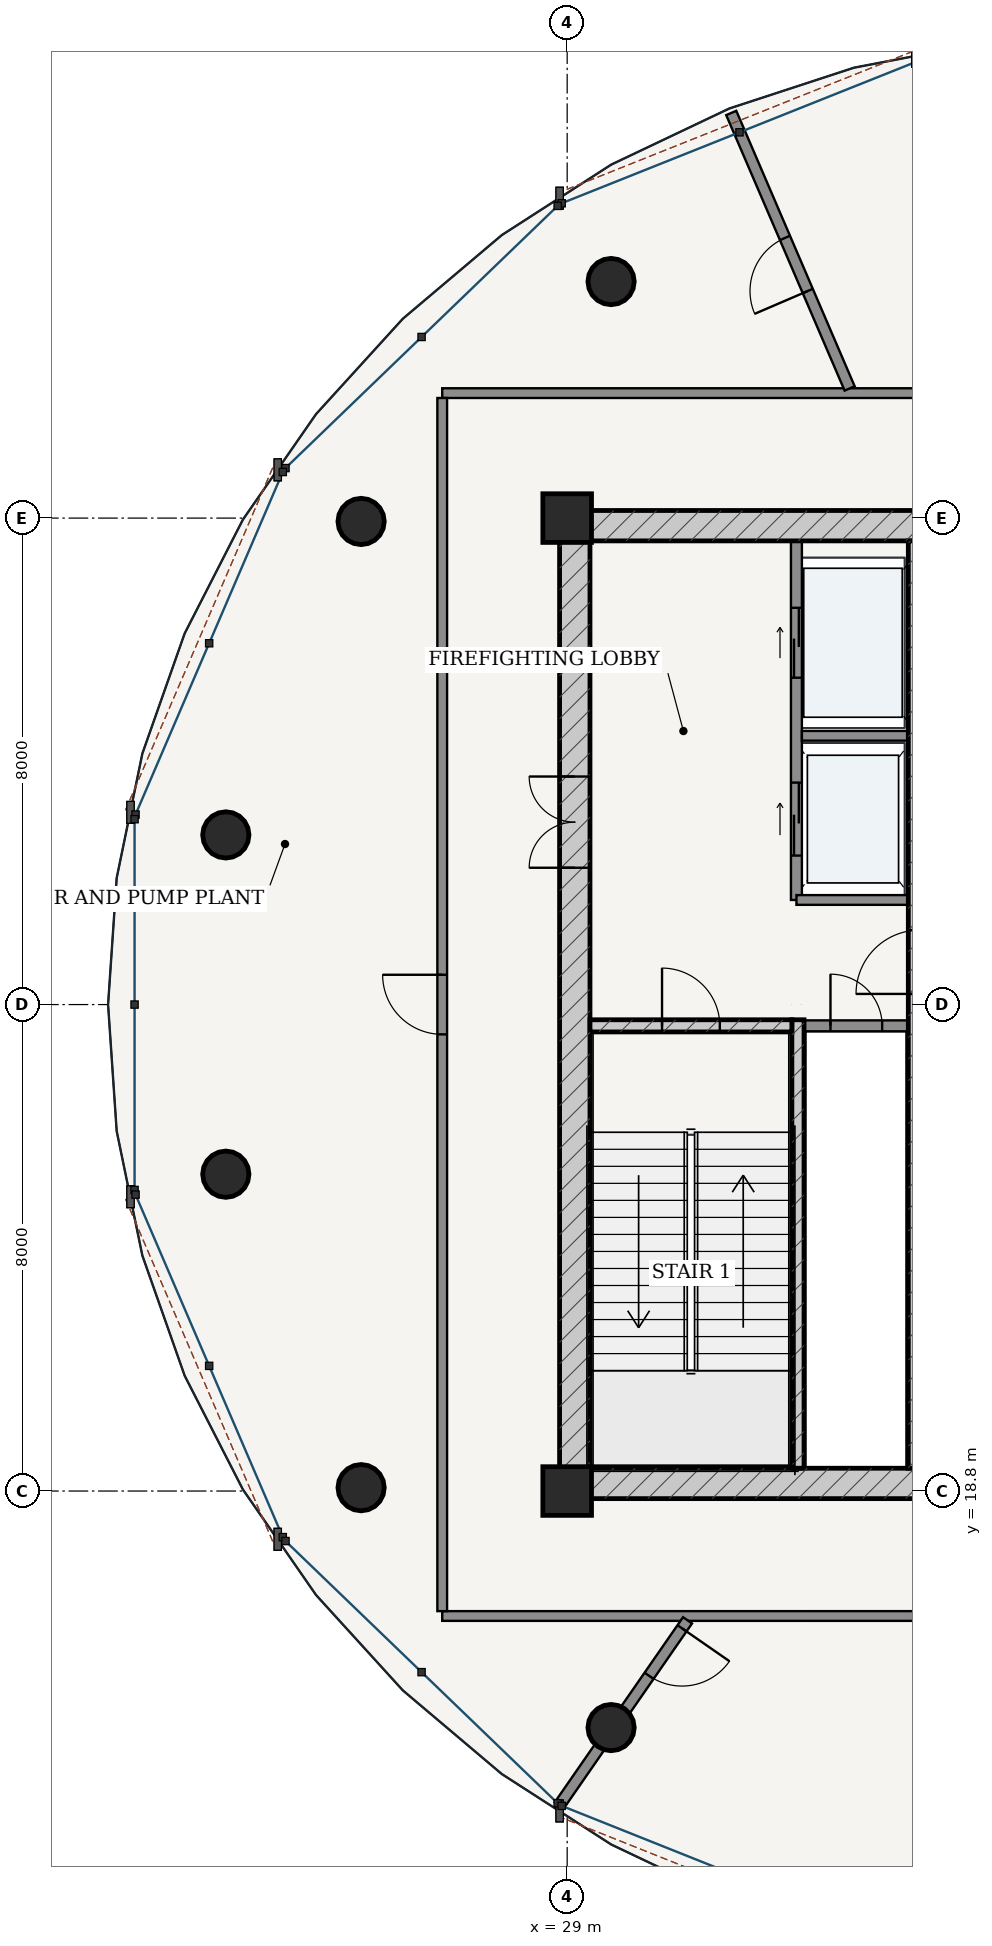
"""IFC4 building model, lengths in metres.
Left out: names, types, materials, properties, quantities, classifications, styles, units other than length and angle.
Written with IfcOpenShell. Run it as: python <this file> out.ifc"""

import sys

from ifc_helpers import new_model, si_unit, direction, frame, frame_2d, origin, origin_2d, place, context, subcontext, project, spatial, rectangle, hollow_circle, extrude, source, transform, mapped, element, fill, save


model = new_model("IFC4")
c1 = context("Model", 3, precision=1e-05, world=origin(), true_north=direction((-0.2419218956, 0.970295726276)))
c2 = subcontext(c1, "Body", "Model", "MODEL_VIEW")
j1 = project(units=[si_unit("LENGTHUNIT", "METRE"), si_unit("PLANEANGLEUNIT", "RADIAN")], contexts=[c1])
p1 = place(None, origin())
s1 = spatial("IfcSite", under=j1, at=p1, CompositionType="ELEMENT")
p2 = place(p1, origin())
s2 = spatial("IfcBuilding", under=s1, at=p2, CompositionType="ELEMENT")
p3 = place(p2, frame((0.0, 0.0, 326.9)))
s3 = spatial("IfcBuildingStorey", under=s2, at=p3, CompositionType="ELEMENT", Elevation=326.9)
for number, where, z_axis, x_axis in (
    (1, (29.0, 18.8, 0.0), (0.0, 0.0, 1.0), (1.0, 0.0, 0.0)),
    (2, (29.0, 34.8, 0.0), (0.0, 0.0, 1.0), (1.0, 0.0, 0.0)),
):
    element("IfcColumn", number, at=place(p3, frame(where, z_axis=z_axis, x_axis=x_axis)), inside=s3, PredefinedType="COLUMN", context=c2, shape_type="SweptSolid", body=[
        extrude(rectangle(XDim=0.8, YDim=0.8, at=origin_2d()), origin(), (0.0, 0.0, 1.0), 5.2),
    ])
p4 = place(p3, frame((28.875, 18.925, 0.0), z_axis=(0.0, 0.0, 1.0), x_axis=(1.0, 0.0, 0.0)))
e3 = element("IfcWall", 3, at=p4, inside=s3, PredefinedType="SHEAR", context=c2, shape_type="SweptSolid", body=[
    extrude(rectangle(XDim=18.25, YDim=0.5, at=frame_2d((9.125, 0.0))), origin(), (0.0, 0.0, 1.0), 4.78),
])
p5 = place(p4, frame((8.7, 0.0, 0.0)))
e4 = element("IfcOpeningElement", 4, at=p5, cuts=e3, PredefinedType="OPENING", context=c2, shape_type="SweptSolid", body=[
    extrude(rectangle(XDim=0.85, YDim=2.1, at=frame_2d((0.425, 1.05))), frame((0.0, 0.26, 0.0), z_axis=(0.0, -1.0, 0.0), x_axis=(1.0, 0.0, 0.0)), (0.0, 0.0, 1.0), 0.52),
])
p6 = place(p3, frame((28.875, 34.675, 0.0), z_axis=(0.0, 0.0, 1.0), x_axis=(1.0, 0.0, 0.0)))
e5 = element("IfcWall", 5, at=p6, inside=s3, PredefinedType="SHEAR", context=c2, shape_type="SweptSolid", body=[
    extrude(rectangle(XDim=18.25, YDim=0.5, at=frame_2d((9.125, 0.0))), origin(), (0.0, 0.0, 1.0), 4.78),
])
p7 = place(p3, frame((29.125, 19.175, 0.0), z_axis=(0.0, 0.0, 1.0), x_axis=(0.0, 1.0, 0.0)))
e6 = element("IfcWall", 6, at=p7, inside=s3, PredefinedType="SHEAR", context=c2, shape_type="SweptSolid", body=[
    extrude(rectangle(XDim=15.25, YDim=0.5, at=frame_2d((7.625, 0.0))), origin(), (0.0, 0.0, 1.0), 4.78),
])
p8 = place(p7, frame((9.875, 0.0, 0.0)))
e7 = element("IfcOpeningElement", 7, at=p8, cuts=e6, PredefinedType="OPENING", context=c2, shape_type="SweptSolid", body=[
    extrude(rectangle(XDim=1.5, YDim=2.2, at=frame_2d((0.75, 1.1))), frame((0.0, 0.26, 0.0), z_axis=(0.0, -1.0, 0.0), x_axis=(1.0, 0.0, 0.0)), (0.0, 0.0, 1.0), 0.52),
])
p9 = place(p3, frame((32.795, 19.175, 0.0), z_axis=(0.0, 0.0, 1.0), x_axis=(0.0, 1.0, 0.0)))
e8 = element("IfcWall", 8, at=p9, inside=s3, PredefinedType="SOLIDWALL", context=c2, shape_type="SweptSolid", body=[
    extrude(rectangle(XDim=7.375, YDim=0.2, at=frame_2d((3.688, 0.0))), origin(), (0.0, 0.0, 1.0), 4.78),
])
p10 = place(p3, frame((29.375, 26.45, 0.0), z_axis=(0.0, 0.0, 1.0), x_axis=(1.0, 0.0, 0.0)))
e9 = element("IfcWall", 9, at=p10, inside=s3, PredefinedType="SOLIDWALL", context=c2, shape_type="SweptSolid", body=[
    extrude(rectangle(XDim=3.32, YDim=0.2, at=frame_2d((1.66, 0.0))), origin(), (0.0, 0.0, 1.0), 4.78),
])
p11 = place(p10, frame((1.185, 0.0, 0.0)))
e10 = element("IfcOpeningElement", 10, at=p11, cuts=e9, PredefinedType="OPENING", context=c2, shape_type="SweptSolid", body=[
    extrude(rectangle(XDim=0.95, YDim=2.15, at=frame_2d((0.475, 1.075))), frame((0.0, 0.11, 0.0), z_axis=(0.0, -1.0, 0.0), x_axis=(1.0, 0.0, 0.0)), (0.0, 0.0, 1.0), 0.22),
])
p12 = place(p3, frame((34.8, 19.175, 0.0), z_axis=(0.0, 0.0, 1.0), x_axis=(0.0, 1.0, 0.0)))
e11 = element("IfcWall", 11, at=p12, inside=s3, PredefinedType="SHEAR", context=c2, shape_type="SweptSolid", body=[
    extrude(rectangle(XDim=15.25, YDim=0.38, at=frame_2d((7.625, 0.0))), origin(), (0.0, 0.0, 1.0), 4.78),
])
p13 = place(p12, frame((7.8, 0.0, 0.0)))
e12 = element("IfcOpeningElement", 12, at=p13, cuts=e11, PredefinedType="OPENING", context=c2, shape_type="SweptSolid", body=[
    extrude(rectangle(XDim=1.05, YDim=2.15, at=frame_2d((0.525, 1.075))), frame((0.0, 0.2, 0.0), z_axis=(0.0, -1.0, 0.0), x_axis=(1.0, 0.0, 0.0)), (0.0, 0.0, 1.0), 0.4),
])
for number, where, z_axis, x_axis in (
    (13, (29.722, 38.69, 0.0), (0.0, 0.0, 1.0), (1.0, 0.0, 0.0)),
    (14, (25.611, 34.745, 0.0), (0.0, 0.0, 1.0), (1.0, 0.0, 0.0)),
    (15, (23.386, 29.59, 0.0), (0.0, 0.0, 1.0), (1.0, 0.0, 0.0)),
    (16, (23.386, 24.01, 0.0), (0.0, 0.0, 1.0), (1.0, 0.0, 0.0)),
    (17, (25.611, 18.855, 0.0), (0.0, 0.0, 1.0), (1.0, 0.0, 0.0)),
    (18, (29.722, 14.91, 0.0), (0.0, 0.0, 1.0), (1.0, 0.0, 0.0)),
):
    element("IfcColumn", number, at=place(p3, frame(where, z_axis=z_axis, x_axis=x_axis)), inside=s3, PredefinedType="COLUMN", context=c2, shape_type="SweptSolid", body=[
        extrude(hollow_circle(Radius=0.381, WallThickness=0.028, at=origin_2d()), origin(), (0.0, 0.0, 1.0), 5.2),
    ])
p14 = place(p3, frame((32.9, 26.45, 0.0), z_axis=(0.0, 0.0, 1.0), x_axis=(1.0, 0.0, 0.0)))
e19 = element("IfcWall", 19, at=p14, inside=s3, PredefinedType="PARTITIONING", context=c2, shape_type="SweptSolid", body=[
    extrude(rectangle(XDim=1.71, YDim=0.18, at=frame_2d((0.855, 0.0))), origin(), (0.0, 0.0, 1.0), 4.78),
])
p15 = place(p14, frame((0.43, 0.0, 0.0)))
e20 = element("IfcOpeningElement", 20, at=p15, cuts=e19, PredefinedType="OPENING", context=c2, shape_type="SweptSolid", body=[
    extrude(rectangle(XDim=0.85, YDim=2.1, at=frame_2d((0.425, 1.05))), frame((0.0, 0.1, 0.0), z_axis=(0.0, -1.0, 0.0), x_axis=(1.0, 0.0, 0.0)), (0.0, 0.0, 1.0), 0.2),
])
p16 = place(p3, frame((32.77, 28.52, 0.0), z_axis=(0.0, 0.0, 1.0), x_axis=(0.0, 1.0, 0.0)))
e21 = element("IfcWall", 21, at=p16, inside=s3, PredefinedType="PARTITIONING", context=c2, shape_type="SweptSolid", body=[
    extrude(rectangle(XDim=5.905, YDim=0.18, at=frame_2d((2.953, 0.0))), origin(), (0.0, 0.0, 1.0), 4.78),
])
p17 = place(p16, frame((3.655, 0.0, 0.0)))
e22 = element("IfcOpeningElement", 22, at=p17, cuts=e21, PredefinedType="OPENING", context=c2, shape_type="SweptSolid", body=[
    extrude(rectangle(XDim=1.15, YDim=2.2, at=frame_2d((0.575, 1.1))), frame((0.0, 0.1, 0.0), z_axis=(0.0, -1.0, 0.0), x_axis=(1.0, 0.0, 0.0)), (0.0, 0.0, 1.0), 0.2),
])
p18 = place(p16, frame((0.73, 0.0, 0.0)))
e23 = element("IfcOpeningElement", 23, at=p18, cuts=e21, PredefinedType="OPENING", context=c2, shape_type="SweptSolid", body=[
    extrude(rectangle(XDim=1.2, YDim=2.25, at=frame_2d((0.6, 1.125))), frame((0.0, 0.1, 0.0), z_axis=(0.0, -1.0, 0.0), x_axis=(1.0, 0.0, 0.0)), (0.0, 0.0, 1.0), 0.2),
])
p19 = place(p3, frame((32.86, 31.22, 0.0), z_axis=(0.0, 0.0, 1.0), x_axis=(1.0, 0.0, 0.0)))
e24 = element("IfcWall", 24, at=p19, inside=s3, PredefinedType="PARTITIONING", context=c2, shape_type="SweptSolid", body=[
    extrude(rectangle(XDim=1.75, YDim=0.16, at=frame_2d((0.875, 0.0))), origin(), (0.0, 0.0, 1.0), 4.78),
])
p20 = place(p3, frame((32.77, 28.52, 0.0), z_axis=(0.0, 0.0, 1.0), x_axis=(1.0, 0.0, 0.0)))
e25 = element("IfcWall", 25, at=p20, inside=s3, PredefinedType="PARTITIONING", context=c2, shape_type="SweptSolid", body=[
    extrude(rectangle(XDim=1.84, YDim=0.16, at=frame_2d((0.92, 0.0))), origin(), (0.0, 0.0, 1.0), 4.78),
])
p21 = place(p3, frame((26.945, 16.745, 0.0), z_axis=(0.0, 0.0, 1.0), x_axis=(1.0, 0.0, 0.0)))
e26 = element("IfcWall", 26, at=p21, inside=s3, PredefinedType="PARTITIONING", context=c2, shape_type="SweptSolid", body=[
    extrude(rectangle(XDim=22.11, YDim=0.16, at=frame_2d((11.055, 0.0))), origin(), (0.0, 0.0, 1.0), 4.352),
])
p22 = place(p21, frame((12.424, 0.0, 0.0)))
e27 = element("IfcOpeningElement", 27, at=p22, cuts=e26, PredefinedType="OPENING", context=c2, shape_type="SweptSolid", body=[
    extrude(rectangle(XDim=0.98, YDim=2.2, at=frame_2d((0.49, 1.1))), frame((0.0, 0.09, 0.0), z_axis=(0.0, -1.0, 0.0), x_axis=(1.0, 0.0, 0.0)), (0.0, 0.0, 1.0), 0.18),
])
p23 = place(p3, frame((26.945, 36.855, 0.0), z_axis=(0.0, 0.0, 1.0), x_axis=(1.0, 0.0, 0.0)))
e28 = element("IfcWall", 28, at=p23, inside=s3, PredefinedType="PARTITIONING", context=c2, shape_type="SweptSolid", body=[
    extrude(rectangle(XDim=22.11, YDim=0.16, at=frame_2d((11.055, 0.0))), origin(), (0.0, 0.0, 1.0), 4.352),
])
p24 = place(p23, frame((13.768, 0.0, 0.0)))
e29 = element("IfcOpeningElement", 29, at=p24, cuts=e28, PredefinedType="OPENING", context=c2, shape_type="SweptSolid", body=[
    extrude(rectangle(XDim=0.98, YDim=2.2, at=frame_2d((0.49, 1.1))), frame((0.0, 0.09, 0.0), z_axis=(0.0, -1.0, 0.0), x_axis=(1.0, 0.0, 0.0)), (0.0, 0.0, 1.0), 0.18),
])
p25 = place(p3, frame((26.945, 16.825, 0.0), z_axis=(0.0, 0.0, 1.0), x_axis=(0.0, 1.0, 0.0)))
e30 = element("IfcWall", 30, at=p25, inside=s3, PredefinedType="PARTITIONING", context=c2, shape_type="SweptSolid", body=[
    extrude(rectangle(XDim=19.95, YDim=0.16, at=frame_2d((9.975, 0.0))), origin(), (0.0, 0.0, 1.0), 4.352),
])
p26 = place(p25, frame((9.485, 0.0, 0.0)))
e31 = element("IfcOpeningElement", 31, at=p26, cuts=e30, PredefinedType="OPENING", context=c2, shape_type="SweptSolid", body=[
    extrude(rectangle(XDim=0.98, YDim=2.2, at=frame_2d((0.49, 1.1))), frame((0.0, 0.09, 0.0), z_axis=(0.0, -1.0, 0.0), x_axis=(1.0, 0.0, 0.0)), (0.0, 0.0, 1.0), 0.18),
])
p27 = place(p3, frame((33.645, 36.932, 0.0), z_axis=(0.0, 0.0, 1.0), x_axis=(-0.394839297391, 0.918750199584, 0.0)))
e32 = element("IfcWall", 32, at=p27, inside=s3, PredefinedType="PARTITIONING", context=c2, shape_type="SweptSolid", body=[
    extrude(rectangle(XDim=4.931, YDim=0.18, at=frame_2d((2.466, 0.0))), origin(), (0.0, 0.0, 1.0), 4.411),
])
p28 = place(p27, frame((1.744, 0.0, 0.0)))
e33 = element("IfcOpeningElement", 33, at=p28, cuts=e32, PredefinedType="OPENING", context=c2, shape_type="SweptSolid", body=[
    extrude(rectangle(XDim=0.95, YDim=2.15, at=frame_2d((0.475, 1.075))), frame((0.0, 0.1, 0.0), z_axis=(0.0, -1.0, 0.0), x_axis=(1.0, 0.0, 0.0)), (0.0, 0.0, 1.0), 0.2),
])
p29 = place(p3, frame((30.979, 16.674, 0.0), z_axis=(0.0, 0.0, 1.0), x_axis=(-0.569738046405, -0.82182635543, 0.0)))
e34 = element("IfcWall", 34, at=p29, inside=s3, PredefinedType="PARTITIONING", context=c2, shape_type="SweptSolid", body=[
    extrude(rectangle(XDim=3.701, YDim=0.18, at=frame_2d((1.851, 0.0))), origin(), (0.0, 0.0, 1.0), 4.352),
])
p30 = place(p29, frame((0.16, 0.0, 0.0)))
e35 = element("IfcOpeningElement", 35, at=p30, cuts=e34, PredefinedType="OPENING", context=c2, shape_type="SweptSolid", body=[
    extrude(rectangle(XDim=0.95, YDim=2.15, at=frame_2d((0.475, 1.075))), frame((0.0, 0.1, 0.0), z_axis=(0.0, -1.0, 0.0), x_axis=(1.0, 0.0, 0.0)), (0.0, 0.0, 1.0), 0.2),
])
m1 = source(origin(), c2, "Body", "SweptSolid", [
    extrude(rectangle(XDim=1.5, YDim=2.2, at=frame_2d((0.75, 1.1))), frame((0.0, 0.025, 0.0), z_axis=(0.0, -1.0, 0.0), x_axis=(1.0, 0.0, 0.0)), (0.0, 0.0, 1.0), 0.05),
])
p31 = place(p8, origin())
e36 = element("IfcDoor", 36, at=p31, inside=s3, OperationType="DOUBLE_DOOR_SINGLE_SWING", PredefinedType="DOOR", context=c2, shape_type="MappedRepresentation", body=[
    mapped(m1, transform((0.0, 0.0, 0.0), scale=1.0)),
])
fill(e7, e36)
m2 = source(origin(), c2, "Body", "SweptSolid", [
    extrude(rectangle(XDim=0.95, YDim=2.15, at=frame_2d((0.475, 1.075))), frame((0.0, 0.025, 0.0), z_axis=(0.0, -1.0, 0.0), x_axis=(1.0, 0.0, 0.0)), (0.0, 0.0, 1.0), 0.05),
])
p32 = place(p11, origin())
e37 = element("IfcDoor", 37, at=p32, inside=s3, OperationType="SINGLE_SWING_LEFT", PredefinedType="DOOR", context=c2, shape_type="MappedRepresentation", body=[
    mapped(m2, transform((0.0, 0.0, 0.0), scale=1.0)),
])
fill(e10, e37)
m3 = source(origin(), c2, "Body", "SweptSolid", [
    extrude(rectangle(XDim=0.85, YDim=2.1, at=frame_2d((0.425, 1.05))), frame((0.0, 0.025, 0.0), z_axis=(0.0, -1.0, 0.0), x_axis=(1.0, 0.0, 0.0)), (0.0, 0.0, 1.0), 0.05),
])
p33 = place(p15, origin())
e38 = element("IfcDoor", 38, at=p33, inside=s3, OperationType="SINGLE_SWING_LEFT", PredefinedType="DOOR", context=c2, shape_type="MappedRepresentation", body=[
    mapped(m3, transform((0.0, 0.0, 0.0), scale=1.0)),
])
fill(e20, e38)
m4 = source(origin(), c2, "Body", "SweptSolid", [
    extrude(rectangle(XDim=1.15, YDim=2.2, at=frame_2d((0.575, 1.1))), frame((0.0, 0.025, 0.0), z_axis=(0.0, -1.0, 0.0), x_axis=(1.0, 0.0, 0.0)), (0.0, 0.0, 1.0), 0.05),
])
p34 = place(p17, origin())
e39 = element("IfcDoor", 39, at=p34, inside=s3, OperationType="DOUBLE_DOOR_SLIDING", PredefinedType="DOOR", context=c2, shape_type="MappedRepresentation", body=[
    mapped(m4, transform((0.0, 0.0, 0.0), scale=1.0)),
])
fill(e22, e39)
m5 = source(origin(), c2, "Body", "SweptSolid", [
    extrude(rectangle(XDim=1.2, YDim=2.25, at=frame_2d((0.6, 1.125))), frame((0.0, 0.025, 0.0), z_axis=(0.0, -1.0, 0.0), x_axis=(1.0, 0.0, 0.0)), (0.0, 0.0, 1.0), 0.05),
])
p35 = place(p18, origin())
e40 = element("IfcDoor", 40, at=p35, inside=s3, OperationType="DOUBLE_DOOR_SLIDING", PredefinedType="DOOR", context=c2, shape_type="MappedRepresentation", body=[
    mapped(m5, transform((0.0, 0.0, 0.0), scale=1.0)),
])
fill(e23, e40)
m6 = source(origin(), c2, "Body", "SweptSolid", [
    extrude(rectangle(XDim=0.98, YDim=2.2, at=frame_2d((0.49, 1.1))), frame((0.0, 0.025, 0.0), z_axis=(0.0, -1.0, 0.0), x_axis=(1.0, 0.0, 0.0)), (0.0, 0.0, 1.0), 0.05),
])
p36 = place(p26, origin())
e41 = element("IfcDoor", 41, at=p36, inside=s3, OperationType="SINGLE_SWING_RIGHT", PredefinedType="DOOR", context=c2, shape_type="MappedRepresentation", body=[
    mapped(m6, transform((0.0, 0.0, 0.0), scale=1.0)),
])
fill(e31, e41)
p37 = place(p28, origin())
e42 = element("IfcDoor", 42, at=p37, inside=s3, OperationType="SINGLE_SWING_LEFT", PredefinedType="DOOR", context=c2, shape_type="MappedRepresentation", body=[
    mapped(m2, transform((0.0, 0.0, 0.0), scale=1.0)),
])
fill(e33, e42)
p38 = place(p30, origin())
e43 = element("IfcDoor", 43, at=p38, inside=s3, OperationType="SINGLE_SWING_LEFT", PredefinedType="DOOR", context=c2, shape_type="MappedRepresentation", body=[
    mapped(m2, transform((0.0, 0.0, 0.0), scale=1.0)),
])
fill(e35, e43)
save(model, sys.argv[1])
